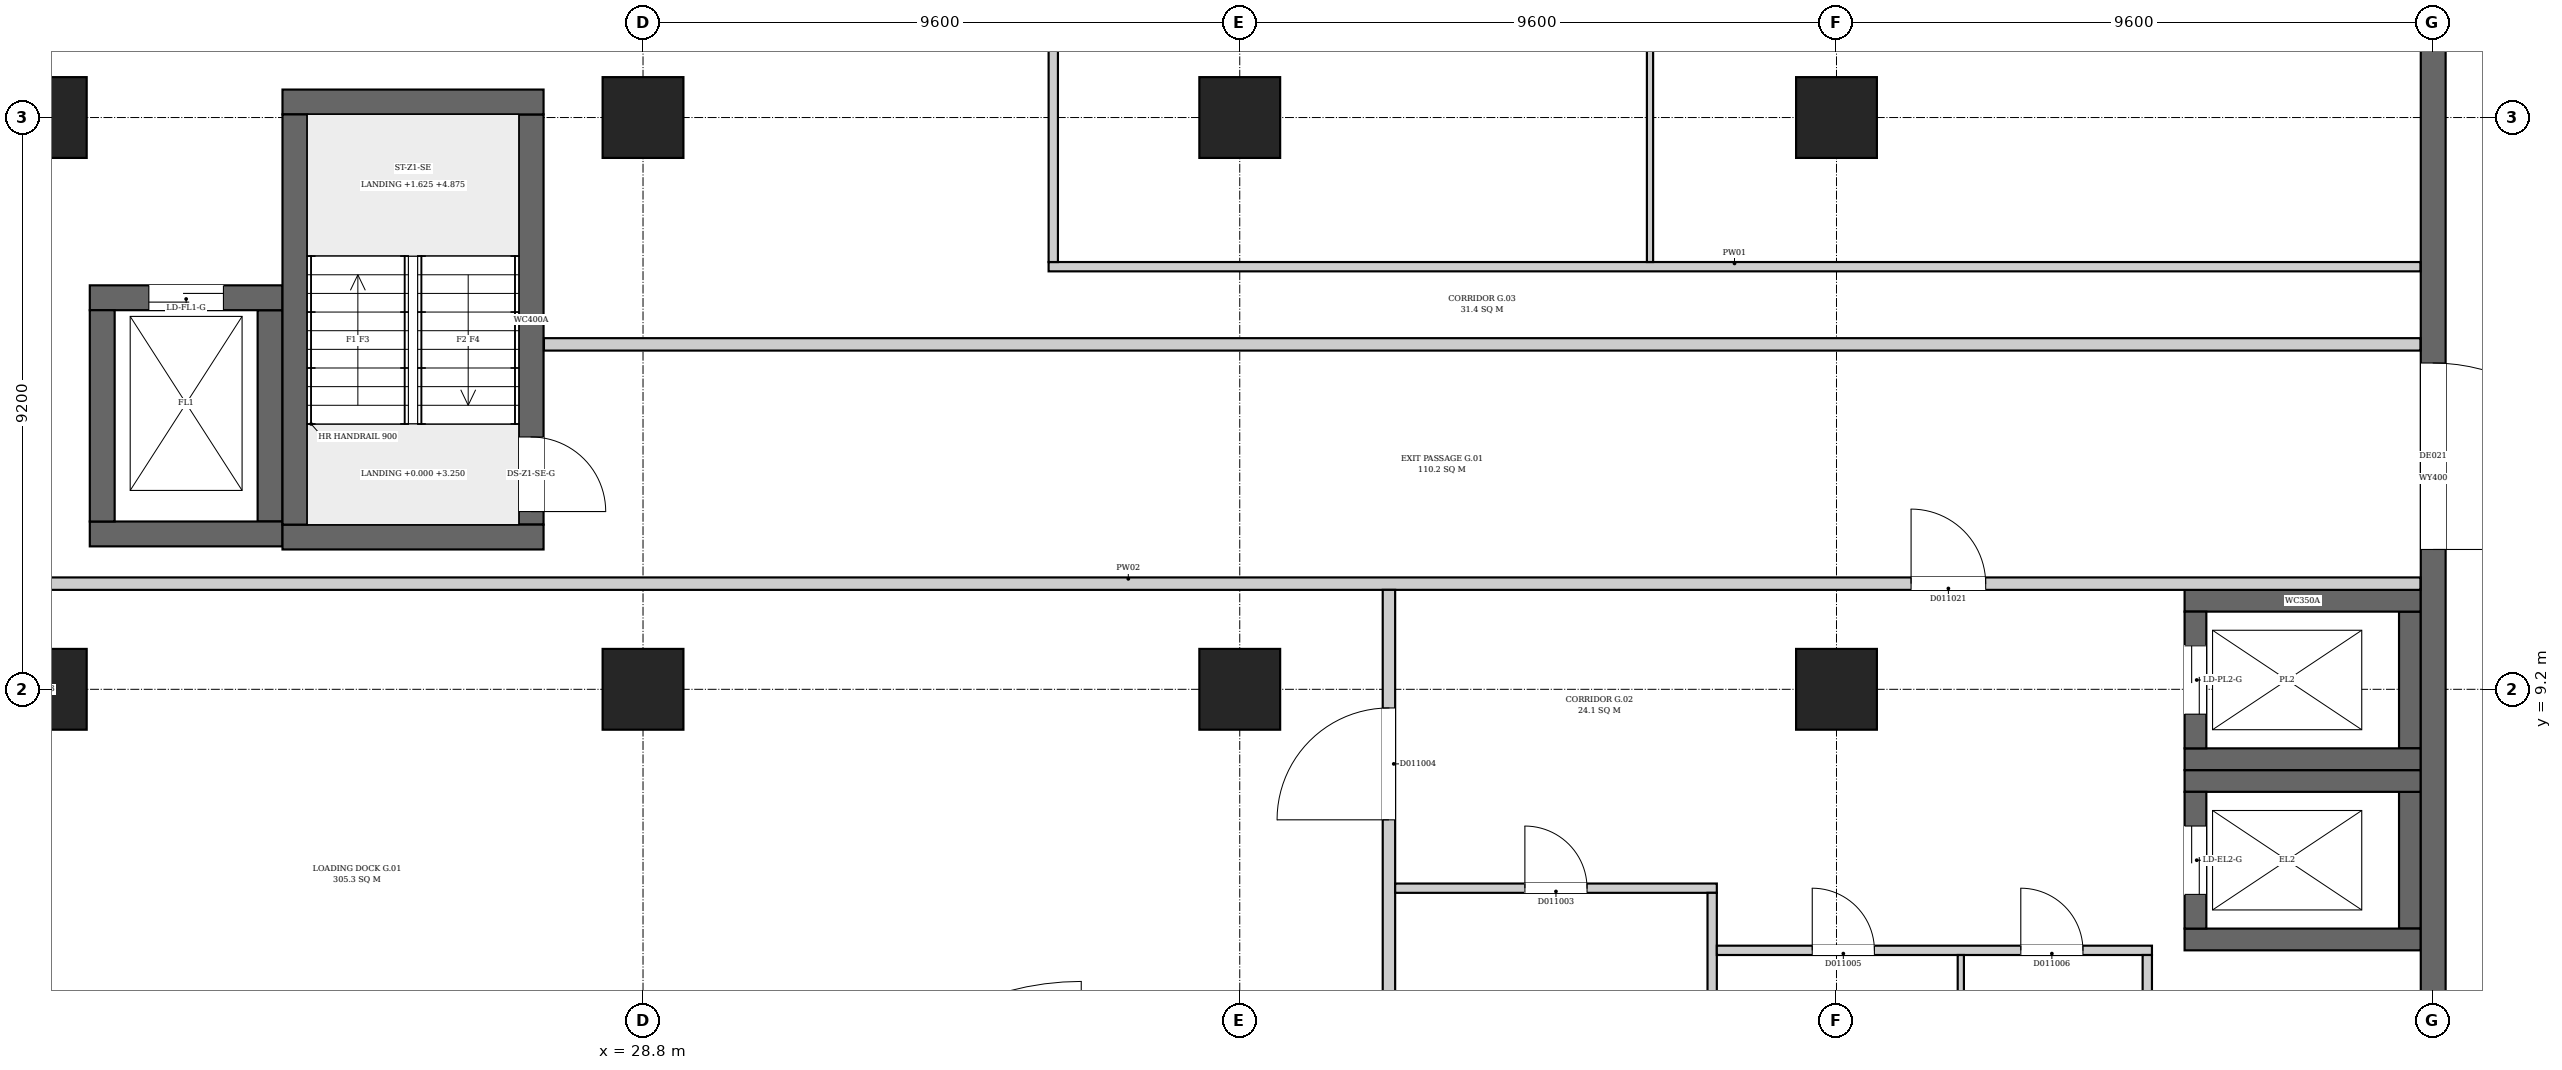
"""IFC4 building model, lengths in metres.
Left out: names, types, materials, properties, quantities, classifications, styles, units other than length and angle.
Written with IfcOpenShell. Run it as: python <this file> out.ifc"""

import sys

from ifc_helpers import new_model, si_unit, direction, frame, frame_2d, origin, origin_2d, place, context, subcontext, project, spatial, rectangle, extrude, element, fill, save


model = new_model("IFC4")
c1 = context("Model", 3, precision=1e-05, world=origin(), true_north=direction((0.0, 1.0)))
c2 = subcontext(c1, "Body", "Model", "MODEL_VIEW")
j1 = project(units=[si_unit("LENGTHUNIT", "METRE"), si_unit("PLANEANGLEUNIT", "RADIAN")], contexts=[c1])
p1 = place(None, origin())
s1 = spatial("IfcSite", under=j1, at=p1, CompositionType="ELEMENT")
p2 = place(p1, origin())
s2 = spatial("IfcBuilding", under=s1, at=p2, CompositionType="ELEMENT")
p3 = place(p2, origin())
s3 = spatial("IfcBuildingStorey", under=s2, at=p3, CompositionType="ELEMENT", Elevation=0.0)
p4 = place(p3, frame((57.6, -0.2, 0.0), z_axis=(0.0, 0.0, 1.0), x_axis=(0.0, 1.0, 0.0)))
e1 = element("IfcWall", 1, at=p4, inside=s3, PredefinedType="SHEAR", context=c2, shape_type="SweptSolid", body=[
    extrude(rectangle(XDim=46.88, YDim=0.4, at=frame_2d((23.44, 0.0))), origin(), (0.0, 0.0, 1.0), 6.5),
])
p5 = place(p4, frame((11.65, 0.0, 0.0)))
e2 = element("IfcOpeningElement", 2, at=p5, cuts=e1, PredefinedType="OPENING", context=c2, shape_type="SweptSolid", body=[
    extrude(rectangle(XDim=3.0, YDim=2.4, at=frame_2d((1.5, 1.2))), frame((0.0, 0.21, 0.0), z_axis=(0.0, -1.0, 0.0), x_axis=(1.0, 0.0, 0.0)), (0.0, 0.0, 1.0), 0.42),
])
p6 = place(p4, frame((38.2, 0.0, 0.0)))
e3 = element("IfcOpeningElement", 3, at=p6, cuts=e1, PredefinedType="OPENING", context=c2, shape_type="SweptSolid", body=[
    extrude(rectangle(XDim=3.0, YDim=2.4, at=frame_2d((1.5, 1.2))), frame((0.0, 0.21, 0.0), z_axis=(0.0, -1.0, 0.0), x_axis=(1.0, 0.0, 0.0)), (0.0, 0.0, 1.0), 0.42),
])
for number, where, z_axis, x_axis in (
    (4, (23.0, 11.65, 0.0), (0.0, 0.0, 1.0), (1.0, 0.0, 0.0)),
    (5, (23.0, 18.65, 0.0), (0.0, 0.0, 1.0), (1.0, 0.0, 0.0)),
):
    element("IfcWall", number, at=place(p3, frame(where, z_axis=z_axis, x_axis=x_axis)), inside=s3, PredefinedType="SHEAR", context=c2, shape_type="SweptSolid", body=[
        extrude(rectangle(XDim=4.2, YDim=0.4, at=frame_2d((2.1, 0.0))), origin(), (0.0, 0.0, 1.0), 6.5),
    ])
p7 = place(p3, frame((23.2, 11.85, 0.0), z_axis=(0.0, 0.0, 1.0), x_axis=(0.0, 1.0, 0.0)))
e6 = element("IfcWall", 6, at=p7, inside=s3, PredefinedType="SHEAR", context=c2, shape_type="SweptSolid", body=[
    extrude(rectangle(XDim=6.6, YDim=0.4, at=frame_2d((3.3, 0.0))), origin(), (0.0, 0.0, 1.0), 6.5),
])
p8 = place(p3, frame((27.0, 11.85, 0.0), z_axis=(0.0, 0.0, 1.0), x_axis=(0.0, 1.0, 0.0)))
e7 = element("IfcWall", 7, at=p8, inside=s3, PredefinedType="SHEAR", context=c2, shape_type="SweptSolid", body=[
    extrude(rectangle(XDim=6.6, YDim=0.4, at=frame_2d((3.3, 0.0))), origin(), (0.0, 0.0, 1.0), 6.5),
])
p9 = place(p8, frame((0.21, 0.0, 0.0)))
e8 = element("IfcOpeningElement", 8, at=p9, cuts=e7, PredefinedType="OPENING", context=c2, shape_type="SweptSolid", body=[
    extrude(rectangle(XDim=1.2, YDim=2.1, at=frame_2d((0.6, 1.05))), frame((0.0, 0.21, 0.0), z_axis=(0.0, -1.0, 0.0), x_axis=(1.0, 0.0, 0.0)), (0.0, 0.0, 1.0), 0.42),
])
for number, where, z_axis, x_axis in (
    (9, (53.6, 5.175, 0.0), (0.0, 0.0, 1.0), (1.0, 0.0, 0.0)),
    (10, (53.6, 7.725, 0.0), (0.0, 0.0, 1.0), (1.0, 0.0, 0.0)),
):
    element("IfcWall", number, at=place(p3, frame(where, z_axis=z_axis, x_axis=x_axis)), inside=s3, PredefinedType="SHEAR", context=c2, shape_type="SweptSolid", body=[
        extrude(rectangle(XDim=3.8, YDim=0.35, at=frame_2d((1.9, 0.0))), origin(), (0.0, 0.0, 1.0), 6.5),
    ])
p10 = place(p3, frame((53.775, 5.35, 0.0), z_axis=(0.0, 0.0, 1.0), x_axis=(0.0, 1.0, 0.0)))
e11 = element("IfcWall", 11, at=p10, inside=s3, PredefinedType="SHEAR", context=c2, shape_type="SweptSolid", body=[
    extrude(rectangle(XDim=2.2, YDim=0.35, at=frame_2d((1.1, 0.0))), origin(), (0.0, 0.0, 1.0), 6.5),
])
p11 = place(p10, frame((0.55, 0.0, 0.0)))
e12 = element("IfcOpeningElement", 12, at=p11, cuts=e11, PredefinedType="OPENING", context=c2, shape_type="SweptSolid", body=[
    extrude(rectangle(XDim=1.1, YDim=2.1, at=frame_2d((0.55, 1.05))), frame((0.0, 0.185, 0.0), z_axis=(0.0, -1.0, 0.0), x_axis=(1.0, 0.0, 0.0)), (0.0, 0.0, 1.0), 0.37),
])
p12 = place(p3, frame((57.225, 5.35, 0.0), z_axis=(0.0, 0.0, 1.0), x_axis=(0.0, 1.0, 0.0)))
e13 = element("IfcWall", 13, at=p12, inside=s3, PredefinedType="SHEAR", context=c2, shape_type="SweptSolid", body=[
    extrude(rectangle(XDim=2.2, YDim=0.35, at=frame_2d((1.1, 0.0))), origin(), (0.0, 0.0, 1.0), 6.5),
])
for number, where, z_axis, x_axis in (
    (14, (53.6, 8.075, 0.0), (0.0, 0.0, 1.0), (1.0, 0.0, 0.0)),
    (15, (53.6, 10.625, 0.0), (0.0, 0.0, 1.0), (1.0, 0.0, 0.0)),
):
    element("IfcWall", number, at=place(p3, frame(where, z_axis=z_axis, x_axis=x_axis)), inside=s3, PredefinedType="SHEAR", context=c2, shape_type="SweptSolid", body=[
        extrude(rectangle(XDim=3.8, YDim=0.35, at=frame_2d((1.9, 0.0))), origin(), (0.0, 0.0, 1.0), 6.5),
    ])
p13 = place(p3, frame((53.775, 8.25, 0.0), z_axis=(0.0, 0.0, 1.0), x_axis=(0.0, 1.0, 0.0)))
e16 = element("IfcWall", 16, at=p13, inside=s3, PredefinedType="SHEAR", context=c2, shape_type="SweptSolid", body=[
    extrude(rectangle(XDim=2.2, YDim=0.35, at=frame_2d((1.1, 0.0))), origin(), (0.0, 0.0, 1.0), 6.5),
])
p14 = place(p13, frame((0.55, 0.0, 0.0)))
e17 = element("IfcOpeningElement", 17, at=p14, cuts=e16, PredefinedType="OPENING", context=c2, shape_type="SweptSolid", body=[
    extrude(rectangle(XDim=1.1, YDim=2.1, at=frame_2d((0.55, 1.05))), frame((0.0, 0.185, 0.0), z_axis=(0.0, -1.0, 0.0), x_axis=(1.0, 0.0, 0.0)), (0.0, 0.0, 1.0), 0.37),
])
p15 = place(p3, frame((57.225, 8.25, 0.0), z_axis=(0.0, 0.0, 1.0), x_axis=(0.0, 1.0, 0.0)))
e18 = element("IfcWall", 18, at=p15, inside=s3, PredefinedType="SHEAR", context=c2, shape_type="SweptSolid", body=[
    extrude(rectangle(XDim=2.2, YDim=0.35, at=frame_2d((1.1, 0.0))), origin(), (0.0, 0.0, 1.0), 6.5),
])
p16 = place(p3, frame((19.9, 11.7, 0.0), z_axis=(0.0, 0.0, 1.0), x_axis=(1.0, 0.0, 0.0)))
e19 = element("IfcWall", 19, at=p16, inside=s3, PredefinedType="SHEAR", context=c2, shape_type="SweptSolid", body=[
    extrude(rectangle(XDim=3.1, YDim=0.4, at=frame_2d((1.55, 0.0))), origin(), (0.0, 0.0, 1.0), 6.5),
])
p17 = place(p3, frame((19.9, 15.5, 0.0), z_axis=(0.0, 0.0, 1.0), x_axis=(1.0, 0.0, 0.0)))
e20 = element("IfcWall", 20, at=p17, inside=s3, PredefinedType="SHEAR", context=c2, shape_type="SweptSolid", body=[
    extrude(rectangle(XDim=3.1, YDim=0.4, at=frame_2d((1.55, 0.0))), origin(), (0.0, 0.0, 1.0), 6.5),
])
p18 = place(p17, frame((0.95, 0.0, 0.0)))
e21 = element("IfcOpeningElement", 21, at=p18, cuts=e20, PredefinedType="OPENING", context=c2, shape_type="SweptSolid", body=[
    extrude(rectangle(XDim=1.2, YDim=2.1, at=frame_2d((0.6, 1.05))), frame((0.0, 0.21, 0.0), z_axis=(0.0, -1.0, 0.0), x_axis=(1.0, 0.0, 0.0)), (0.0, 0.0, 1.0), 0.42),
])
for number, where, z_axis, x_axis in (
    (22, (20.1, 11.9, 0.0), (0.0, 0.0, 1.0), (0.0, 1.0, 0.0)),
    (23, (22.8, 11.9, 0.0), (0.0, 0.0, 1.0), (0.0, 1.0, 0.0)),
):
    element("IfcWall", number, at=place(p3, frame(where, z_axis=z_axis, x_axis=x_axis)), inside=s3, PredefinedType="SHEAR", context=c2, shape_type="SweptSolid", body=[
        extrude(rectangle(XDim=3.4, YDim=0.4, at=frame_2d((1.7, 0.0))), origin(), (0.0, 0.0, 1.0), 6.5),
    ])
for number, where, z_axis, x_axis in (
    (24, (19.2, 9.2, 0.0), (0.0, 0.0, 1.0), (1.0, 0.0, 0.0)),
    (25, (28.8, 9.2, 0.0), (0.0, 0.0, 1.0), (1.0, 0.0, 0.0)),
    (26, (38.4, 9.2, 0.0), (0.0, 0.0, 1.0), (1.0, 0.0, 0.0)),
    (27, (48.0, 9.2, 0.0), (0.0, 0.0, 1.0), (1.0, 0.0, 0.0)),
    (28, (19.2, 18.4, 0.0), (0.0, 0.0, 1.0), (1.0, 0.0, 0.0)),
    (29, (28.8, 18.4, 0.0), (0.0, 0.0, 1.0), (1.0, 0.0, 0.0)),
    (30, (38.4, 18.4, 0.0), (0.0, 0.0, 1.0), (1.0, 0.0, 0.0)),
    (31, (48.0, 18.4, 0.0), (0.0, 0.0, 1.0), (1.0, 0.0, 0.0)),
):
    element("IfcColumn", number, at=place(p3, frame(where, z_axis=z_axis, x_axis=x_axis)), inside=s3, PredefinedType="COLUMN", context=c2, shape_type="SweptSolid", body=[
        extrude(rectangle(XDim=1.3, YDim=1.3, at=origin_2d()), origin(), (0.0, 0.0, 1.0), 6.5),
    ])
p19 = place(p3, frame((7.9, 10.9, 0.0), z_axis=(0.0, 0.0, 1.0), x_axis=(1.0, 0.0, 0.0)))
e32 = element("IfcWall", 32, at=p19, inside=s3, PredefinedType="PARTITIONING", context=c2, shape_type="SweptSolid", body=[
    extrude(rectangle(XDim=49.494, YDim=0.2, at=frame_2d((24.747, 0.0))), origin(), (0.0, 0.0, 1.0), 6.15),
])
p20 = place(p19, frame((41.3, 0.0, 0.0)))
e33 = element("IfcOpeningElement", 33, at=p20, cuts=e32, PredefinedType="OPENING", context=c2, shape_type="SweptSolid", body=[
    extrude(rectangle(XDim=1.2, YDim=2.1, at=frame_2d((0.6, 1.05))), frame((0.0, 0.11, 0.0), z_axis=(0.0, -1.0, 0.0), x_axis=(1.0, 0.0, 0.0)), (0.0, 0.0, 1.0), 0.22),
])
p21 = place(p3, frame((27.206, 14.75, 0.0), z_axis=(0.0, 0.0, 1.0), x_axis=(1.0, 0.0, 0.0)))
e34 = element("IfcWall", 34, at=p21, inside=s3, PredefinedType="PARTITIONING", context=c2, shape_type="SweptSolid", body=[
    extrude(rectangle(XDim=30.188, YDim=0.2, at=frame_2d((15.094, 0.0))), origin(), (0.0, 0.0, 1.0), 6.15),
])
p22 = place(p3, frame((35.325, 16.0, 0.0), z_axis=(0.0, 0.0, 1.0), x_axis=(1.0, 0.0, 0.0)))
e35 = element("IfcWall", 35, at=p22, inside=s3, PredefinedType="PARTITIONING", context=c2, shape_type="SweptSolid", body=[
    extrude(rectangle(XDim=22.069, YDim=0.15, at=frame_2d((11.035, 0.0))), origin(), (0.0, 0.0, 1.0), 6.15),
])
p23 = place(p3, frame((35.4, 16.075, 0.0), z_axis=(0.0, 0.0, 1.0), x_axis=(0.0, 1.0, 0.0)))
e36 = element("IfcWall", 36, at=p23, inside=s3, PredefinedType="PARTITIONING", context=c2, shape_type="SweptSolid", body=[
    extrude(rectangle(XDim=10.85, YDim=0.15, at=frame_2d((5.425, 0.0))), origin(), (0.0, 0.0, 1.0), 6.15),
])
p24 = place(p3, frame((40.8, 0.206, 0.0), z_axis=(0.0, 0.0, 1.0), x_axis=(0.0, 1.0, 0.0)))
e37 = element("IfcWall", 37, at=p24, inside=s3, PredefinedType="PARTITIONING", context=c2, shape_type="SweptSolid", body=[
    extrude(rectangle(XDim=10.594, YDim=0.2, at=frame_2d((5.297, 0.0))), origin(), (0.0, 0.0, 1.0), 6.15),
])
p25 = place(p24, frame((6.894, 0.0, 0.0)))
e38 = element("IfcOpeningElement", 38, at=p25, cuts=e37, PredefinedType="OPENING", context=c2, shape_type="SweptSolid", body=[
    extrude(rectangle(XDim=1.8, YDim=2.1, at=frame_2d((0.9, 1.05))), frame((0.0, 0.11, 0.0), z_axis=(0.0, -1.0, 0.0), x_axis=(1.0, 0.0, 0.0)), (0.0, 0.0, 1.0), 0.22),
])
p26 = place(p3, frame((40.9, 6.0, 0.0), z_axis=(0.0, 0.0, 1.0), x_axis=(1.0, 0.0, 0.0)))
e39 = element("IfcWall", 39, at=p26, inside=s3, PredefinedType="PARTITIONING", context=c2, shape_type="SweptSolid", body=[
    extrude(rectangle(XDim=5.175, YDim=0.15, at=frame_2d((2.587, 0.0))), origin(), (0.0, 0.0, 1.0), 6.15),
])
p27 = place(p26, frame((2.087, 0.0, 0.0)))
e40 = element("IfcOpeningElement", 40, at=p27, cuts=e39, PredefinedType="OPENING", context=c2, shape_type="SweptSolid", body=[
    extrude(rectangle(XDim=1.0, YDim=2.1, at=frame_2d((0.5, 1.05))), frame((0.0, 0.085, 0.0), z_axis=(0.0, -1.0, 0.0), x_axis=(1.0, 0.0, 0.0)), (0.0, 0.0, 1.0), 0.17),
])
p28 = place(p3, frame((45.0, 16.075, 0.0), z_axis=(0.0, 0.0, 1.0), x_axis=(0.0, 1.0, 0.0)))
e41 = element("IfcWall", 41, at=p28, inside=s3, PredefinedType="PARTITIONING", context=c2, shape_type="SweptSolid", body=[
    extrude(rectangle(XDim=10.85, YDim=0.1, at=frame_2d((5.425, 0.0))), origin(), (0.0, 0.0, 1.0), 6.15),
])
p29 = place(p3, frame((46.0, 0.206, 0.0), z_axis=(0.0, 0.0, 1.0), x_axis=(0.0, 1.0, 0.0)))
e42 = element("IfcWall", 42, at=p29, inside=s3, PredefinedType="PARTITIONING", context=c2, shape_type="SweptSolid", body=[
    extrude(rectangle(XDim=5.719, YDim=0.15, at=frame_2d((2.859, 0.0))), origin(), (0.0, 0.0, 1.0), 6.15),
])
p30 = place(p3, frame((46.075, 5.0, 0.0), z_axis=(0.0, 0.0, 1.0), x_axis=(1.0, 0.0, 0.0)))
e43 = element("IfcWall", 43, at=p30, inside=s3, PredefinedType="PARTITIONING", context=c2, shape_type="SweptSolid", body=[
    extrude(rectangle(XDim=7.0, YDim=0.15, at=frame_2d((3.5, 0.0))), origin(), (0.0, 0.0, 1.0), 6.15),
])
p31 = place(p30, frame((1.535, 0.0, 0.0)))
e44 = element("IfcOpeningElement", 44, at=p31, cuts=e43, PredefinedType="OPENING", context=c2, shape_type="SweptSolid", body=[
    extrude(rectangle(XDim=1.0, YDim=2.1, at=frame_2d((0.5, 1.05))), frame((0.0, 0.085, 0.0), z_axis=(0.0, -1.0, 0.0), x_axis=(1.0, 0.0, 0.0)), (0.0, 0.0, 1.0), 0.17),
])
p32 = place(p30, frame((4.89, 0.0, 0.0)))
e45 = element("IfcOpeningElement", 45, at=p32, cuts=e43, PredefinedType="OPENING", context=c2, shape_type="SweptSolid", body=[
    extrude(rectangle(XDim=1.0, YDim=2.1, at=frame_2d((0.5, 1.05))), frame((0.0, 0.085, 0.0), z_axis=(0.0, -1.0, 0.0), x_axis=(1.0, 0.0, 0.0)), (0.0, 0.0, 1.0), 0.17),
])
p33 = place(p3, frame((50.0, 0.206, 0.0), z_axis=(0.0, 0.0, 1.0), x_axis=(0.0, 1.0, 0.0)))
e46 = element("IfcWall", 46, at=p33, inside=s3, PredefinedType="PARTITIONING", context=c2, shape_type="SweptSolid", body=[
    extrude(rectangle(XDim=4.719, YDim=0.1, at=frame_2d((2.359, 0.0))), origin(), (0.0, 0.0, 1.0), 6.15),
])
p34 = place(p3, frame((53.0, 0.206, 0.0), z_axis=(0.0, 0.0, 1.0), x_axis=(0.0, 1.0, 0.0)))
e47 = element("IfcWall", 47, at=p34, inside=s3, PredefinedType="PARTITIONING", context=c2, shape_type="SweptSolid", body=[
    extrude(rectangle(XDim=4.719, YDim=0.15, at=frame_2d((2.359, 0.0))), origin(), (0.0, 0.0, 1.0), 6.15),
])
p35 = place(p5, frame((3.0, 0.0, 0.0), z_axis=(0.0, 0.0, 1.0), x_axis=(-1.0, 0.0, 0.0)))
e48 = element("IfcDoor", 48, at=p35, inside=s3, OperationType="DOUBLE_DOOR_SINGLE_SWING", PredefinedType="DOOR", context=c2, shape_type="SweptSolid", body=[
    extrude(rectangle(XDim=3.0, YDim=2.4, at=frame_2d((1.5, 1.2))), frame((0.0, 0.025, 0.0), z_axis=(0.0, -1.0, 0.0), x_axis=(1.0, 0.0, 0.0)), (0.0, 0.0, 1.0), 0.05),
])
fill(e2, e48)
p36 = place(p9, origin())
e49 = element("IfcDoor", 49, at=p36, inside=s3, OperationType="SINGLE_SWING_LEFT", PredefinedType="DOOR", context=c2, shape_type="SweptSolid", body=[
    extrude(rectangle(XDim=1.2, YDim=2.1, at=frame_2d((0.6, 1.05))), frame((0.0, 0.025, 0.0), z_axis=(0.0, -1.0, 0.0), x_axis=(1.0, 0.0, 0.0)), (0.0, 0.0, 1.0), 0.05),
])
fill(e8, e49)
p37 = place(p11, origin())
e50 = element("IfcDoor", 50, at=p37, inside=s3, OperationType="DOUBLE_DOOR_SLIDING", PredefinedType="DOOR", context=c2, shape_type="SweptSolid", body=[
    extrude(rectangle(XDim=1.1, YDim=2.1, at=frame_2d((0.55, 1.05))), frame((0.0, 0.025, 0.0), z_axis=(0.0, -1.0, 0.0), x_axis=(1.0, 0.0, 0.0)), (0.0, 0.0, 1.0), 0.05),
])
fill(e12, e50)
p38 = place(p14, origin())
e51 = element("IfcDoor", 51, at=p38, inside=s3, OperationType="DOUBLE_DOOR_SLIDING", PredefinedType="DOOR", context=c2, shape_type="SweptSolid", body=[
    extrude(rectangle(XDim=1.1, YDim=2.1, at=frame_2d((0.55, 1.05))), frame((0.0, 0.025, 0.0), z_axis=(0.0, -1.0, 0.0), x_axis=(1.0, 0.0, 0.0)), (0.0, 0.0, 1.0), 0.05),
])
fill(e17, e51)
p39 = place(p18, origin())
e52 = element("IfcDoor", 52, at=p39, inside=s3, OperationType="DOUBLE_DOOR_SLIDING", PredefinedType="DOOR", context=c2, shape_type="SweptSolid", body=[
    extrude(rectangle(XDim=1.2, YDim=2.1, at=frame_2d((0.6, 1.05))), frame((0.0, 0.025, 0.0), z_axis=(0.0, -1.0, 0.0), x_axis=(1.0, 0.0, 0.0)), (0.0, 0.0, 1.0), 0.05),
])
fill(e21, e52)
p40 = place(p27, origin())
e53 = element("IfcDoor", 53, at=p40, inside=s3, OperationType="SINGLE_SWING_RIGHT", PredefinedType="DOOR", context=c2, shape_type="SweptSolid", body=[
    extrude(rectangle(XDim=1.0, YDim=2.1, at=frame_2d((0.5, 1.05))), frame((0.0, 0.025, 0.0), z_axis=(0.0, -1.0, 0.0), x_axis=(1.0, 0.0, 0.0)), (0.0, 0.0, 1.0), 0.05),
])
fill(e40, e53)
p41 = place(p25, origin())
e54 = element("IfcDoor", 54, at=p41, inside=s3, OperationType="DOUBLE_DOOR_SINGLE_SWING", PredefinedType="DOOR", context=c2, shape_type="SweptSolid", body=[
    extrude(rectangle(XDim=1.8, YDim=2.1, at=frame_2d((0.9, 1.05))), frame((0.0, 0.025, 0.0), z_axis=(0.0, -1.0, 0.0), x_axis=(1.0, 0.0, 0.0)), (0.0, 0.0, 1.0), 0.05),
])
fill(e38, e54)
p42 = place(p31, origin())
e55 = element("IfcDoor", 55, at=p42, inside=s3, OperationType="SINGLE_SWING_RIGHT", PredefinedType="DOOR", context=c2, shape_type="SweptSolid", body=[
    extrude(rectangle(XDim=1.0, YDim=2.1, at=frame_2d((0.5, 1.05))), frame((0.0, 0.025, 0.0), z_axis=(0.0, -1.0, 0.0), x_axis=(1.0, 0.0, 0.0)), (0.0, 0.0, 1.0), 0.05),
])
fill(e44, e55)
p43 = place(p32, origin())
e56 = element("IfcDoor", 56, at=p43, inside=s3, OperationType="SINGLE_SWING_LEFT", PredefinedType="DOOR", context=c2, shape_type="SweptSolid", body=[
    extrude(rectangle(XDim=1.0, YDim=2.1, at=frame_2d((0.5, 1.05))), frame((0.0, 0.025, 0.0), z_axis=(0.0, -1.0, 0.0), x_axis=(1.0, 0.0, 0.0)), (0.0, 0.0, 1.0), 0.05),
])
fill(e45, e56)
p44 = place(p20, origin())
e57 = element("IfcDoor", 57, at=p44, inside=s3, OperationType="SINGLE_SWING_LEFT", PredefinedType="DOOR", context=c2, shape_type="SweptSolid", body=[
    extrude(rectangle(XDim=1.2, YDim=2.1, at=frame_2d((0.6, 1.05))), frame((0.0, 0.025, 0.0), z_axis=(0.0, -1.0, 0.0), x_axis=(1.0, 0.0, 0.0)), (0.0, 0.0, 1.0), 0.05),
])
fill(e33, e57)
save(model, sys.argv[1])
